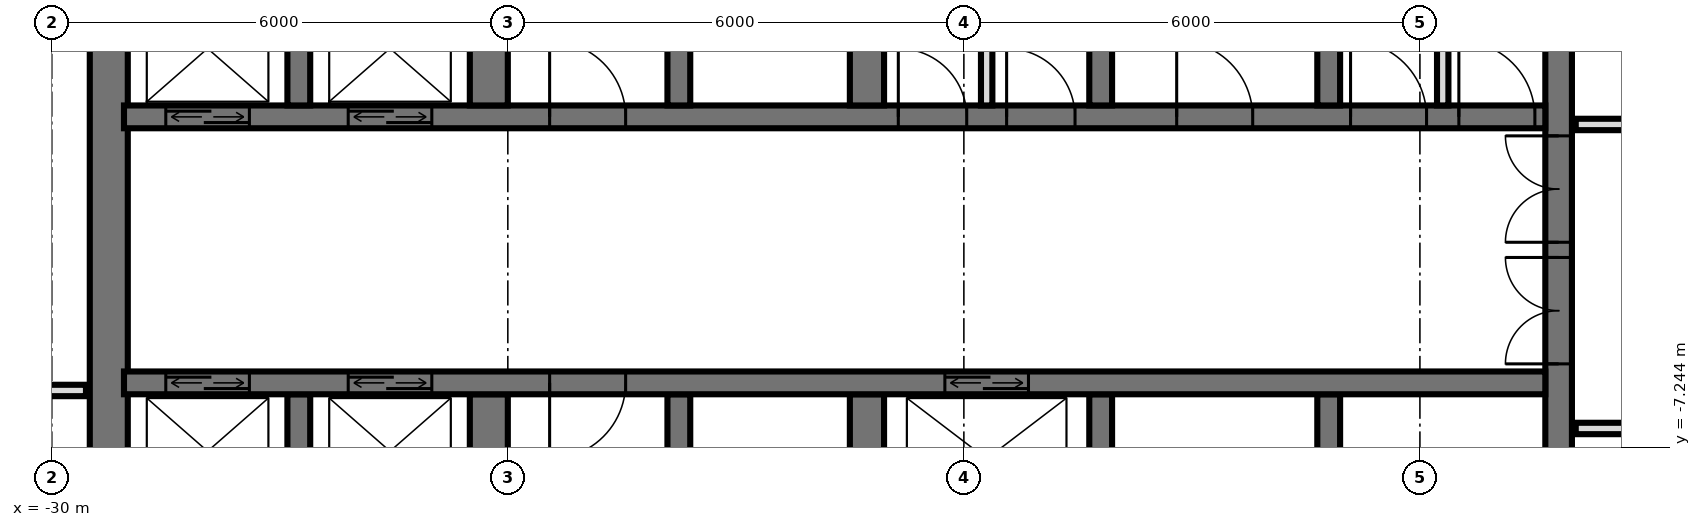
"""IFC4 building model, lengths in metres.
Left out: names, types, materials, properties, quantities, classifications, styles, units other than length and angle.
Written with IfcOpenShell. Run it as: python <this file> out.ifc"""

import sys

from ifc_helpers import new_model, si_unit, direction, frame, frame_2d, origin, place, context, subcontext, project, spatial, rectangle, extrude, element, fill, save


model = new_model("IFC4")
c1 = context("Model", 3, precision=1e-05, world=origin(), true_north=direction((0.0, 1.0)))
c2 = subcontext(c1, "Body", "Model", "MODEL_VIEW")
j1 = project(units=[si_unit("LENGTHUNIT", "METRE"), si_unit("PLANEANGLEUNIT", "RADIAN")], contexts=[c1])
p1 = place(None, origin())
s1 = spatial("IfcSite", under=j1, at=p1, CompositionType="ELEMENT")
p2 = place(p1, origin())
s2 = spatial("IfcBuilding", under=s1, at=p2, CompositionType="ELEMENT")
p3 = place(p2, frame((0.0, 0.0, 67.2)))
s3 = spatial("IfcBuildingStorey", under=s2, at=p3, CompositionType="ELEMENT", Elevation=67.2)
p4 = place(p3, frame((-10.175, -14.55, 0.0), z_axis=(0.0, 0.0, 1.0), x_axis=(0.0, 1.0, 0.0)))
e1 = element("IfcWall", 1, at=p4, inside=s3, PredefinedType="SHEAR", context=c2, shape_type="SweptSolid", body=[
    extrude(rectangle(XDim=14.1, YDim=0.35, at=frame_2d((7.05, 0.0))), origin(), (0.0, 0.0, 1.0), 3.6),
])
p5 = place(p4, frame((8.4, 0.0, 0.0)))
e2 = element("IfcOpeningElement", 2, at=p5, cuts=e1, PredefinedType="OPENING", context=c2, shape_type="SweptSolid", body=[
    extrude(rectangle(XDim=1.4, YDim=2.4, at=frame_2d((0.7, 1.2))), frame((0.0, 0.185, 0.0), z_axis=(0.0, -1.0, 0.0), x_axis=(1.0, 0.0, 0.0)), (0.0, 0.0, 1.0), 0.37),
])
p6 = place(p4, frame((10.0, 0.0, 0.0)))
e3 = element("IfcOpeningElement", 3, at=p6, cuts=e1, PredefinedType="OPENING", context=c2, shape_type="SweptSolid", body=[
    extrude(rectangle(XDim=1.4, YDim=2.4, at=frame_2d((0.7, 1.2))), frame((0.0, 0.185, 0.0), z_axis=(0.0, -1.0, 0.0), x_axis=(1.0, 0.0, 0.0)), (0.0, 0.0, 1.0), 0.37),
])
p7 = place(p4, frame((4.0, 0.0, 0.0)))
e4 = element("IfcOpeningElement", 4, at=p7, cuts=e1, PredefinedType="OPENING", context=c2, shape_type="SweptSolid", body=[
    extrude(rectangle(XDim=1.2, YDim=2.1, at=frame_2d((0.6, 1.05))), frame((0.0, 0.185, 0.0), z_axis=(0.0, -1.0, 0.0), x_axis=(1.0, 0.0, 0.0)), (0.0, 0.0, 1.0), 0.37),
])
p8 = place(p3, frame((-29.25, -14.55, 0.0), z_axis=(0.0, 0.0, 1.0), x_axis=(0.0, 1.0, 0.0)))
e5 = element("IfcWall", 5, at=p8, inside=s3, PredefinedType="SHEAR", context=c2, shape_type="SweptSolid", body=[
    extrude(rectangle(XDim=14.1, YDim=0.5, at=frame_2d((7.05, 0.0))), origin(), (0.0, 0.0, 1.0), 3.6),
])
p9 = place(p3, frame((-29.05, -2.9, 0.0), z_axis=(0.0, 0.0, 1.0), x_axis=(1.0, 0.0, 0.0)))
e6 = element("IfcWall", 6, at=p9, inside=s3, PredefinedType="SHEAR", context=c2, shape_type="SweptSolid", body=[
    extrude(rectangle(XDim=18.7, YDim=0.3, at=frame_2d((9.35, 0.0))), origin(), (0.0, 0.0, 1.0), 3.6),
])
p10 = place(p9, frame((2.95, 0.0, 0.0)))
e7 = element("IfcOpeningElement", 7, at=p10, cuts=e6, PredefinedType="OPENING", context=c2, shape_type="SweptSolid", body=[
    extrude(rectangle(XDim=1.1, YDim=2.1, at=frame_2d((0.55, 1.05))), frame((0.0, 0.16, 0.0), z_axis=(0.0, -1.0, 0.0), x_axis=(1.0, 0.0, 0.0)), (0.0, 0.0, 1.0), 0.32),
])
p11 = place(p9, frame((0.55, 0.0, 0.0)))
e8 = element("IfcOpeningElement", 8, at=p11, cuts=e6, PredefinedType="OPENING", context=c2, shape_type="SweptSolid", body=[
    extrude(rectangle(XDim=1.1, YDim=2.1, at=frame_2d((0.55, 1.05))), frame((0.0, 0.16, 0.0), z_axis=(0.0, -1.0, 0.0), x_axis=(1.0, 0.0, 0.0)), (0.0, 0.0, 1.0), 0.32),
])
p12 = place(p9, frame((11.613, 0.0, 0.0)))
e9 = element("IfcOpeningElement", 9, at=p12, cuts=e6, PredefinedType="OPENING", context=c2, shape_type="SweptSolid", body=[
    extrude(rectangle(XDim=0.9, YDim=2.1, at=frame_2d((0.45, 1.05))), frame((0.0, 0.16, 0.0), z_axis=(0.0, -1.0, 0.0), x_axis=(1.0, 0.0, 0.0)), (0.0, 0.0, 1.0), 0.32),
])
p13 = place(p9, frame((10.188, 0.0, 0.0)))
e10 = element("IfcOpeningElement", 10, at=p13, cuts=e6, PredefinedType="OPENING", context=c2, shape_type="SweptSolid", body=[
    extrude(rectangle(XDim=0.9, YDim=2.1, at=frame_2d((0.45, 1.05))), frame((0.0, 0.16, 0.0), z_axis=(0.0, -1.0, 0.0), x_axis=(1.0, 0.0, 0.0)), (0.0, 0.0, 1.0), 0.32),
])
p14 = place(p9, frame((17.562, 0.0, 0.0)))
e11 = element("IfcOpeningElement", 11, at=p14, cuts=e6, PredefinedType="OPENING", context=c2, shape_type="SweptSolid", body=[
    extrude(rectangle(XDim=1.0, YDim=2.1, at=frame_2d((0.5, 1.05))), frame((0.0, 0.16, 0.0), z_axis=(0.0, -1.0, 0.0), x_axis=(1.0, 0.0, 0.0)), (0.0, 0.0, 1.0), 0.32),
])
p15 = place(p9, frame((16.137, 0.0, 0.0)))
e12 = element("IfcOpeningElement", 12, at=p15, cuts=e6, PredefinedType="OPENING", context=c2, shape_type="SweptSolid", body=[
    extrude(rectangle(XDim=1.0, YDim=2.1, at=frame_2d((0.5, 1.05))), frame((0.0, 0.16, 0.0), z_axis=(0.0, -1.0, 0.0), x_axis=(1.0, 0.0, 0.0)), (0.0, 0.0, 1.0), 0.32),
])
p16 = place(p9, frame((13.85, 0.0, 0.0)))
e13 = element("IfcOpeningElement", 13, at=p16, cuts=e6, PredefinedType="OPENING", context=c2, shape_type="SweptSolid", body=[
    extrude(rectangle(XDim=1.0, YDim=2.1, at=frame_2d((0.5, 1.05))), frame((0.0, 0.16, 0.0), z_axis=(0.0, -1.0, 0.0), x_axis=(1.0, 0.0, 0.0)), (0.0, 0.0, 1.0), 0.32),
])
p17 = place(p9, frame((5.6, 0.0, 0.0)))
e14 = element("IfcOpeningElement", 14, at=p17, cuts=e6, PredefinedType="OPENING", context=c2, shape_type="SweptSolid", body=[
    extrude(rectangle(XDim=1.0, YDim=2.1, at=frame_2d((0.5, 1.05))), frame((0.0, 0.16, 0.0), z_axis=(0.0, -1.0, 0.0), x_axis=(1.0, 0.0, 0.0)), (0.0, 0.0, 1.0), 0.32),
])
p18 = place(p3, frame((-29.05, -6.4, 0.0), z_axis=(0.0, 0.0, 1.0), x_axis=(1.0, 0.0, 0.0)))
e15 = element("IfcWall", 15, at=p18, inside=s3, PredefinedType="SHEAR", context=c2, shape_type="SweptSolid", body=[
    extrude(rectangle(XDim=18.7, YDim=0.3, at=frame_2d((9.35, 0.0))), origin(), (0.0, 0.0, 1.0), 3.6),
])
p19 = place(p18, frame((2.95, 0.0, 0.0)))
e16 = element("IfcOpeningElement", 16, at=p19, cuts=e15, PredefinedType="OPENING", context=c2, shape_type="SweptSolid", body=[
    extrude(rectangle(XDim=1.1, YDim=2.1, at=frame_2d((0.55, 1.05))), frame((0.0, 0.16, 0.0), z_axis=(0.0, -1.0, 0.0), x_axis=(1.0, 0.0, 0.0)), (0.0, 0.0, 1.0), 0.32),
])
p20 = place(p18, frame((0.55, 0.0, 0.0)))
e17 = element("IfcOpeningElement", 17, at=p20, cuts=e15, PredefinedType="OPENING", context=c2, shape_type="SweptSolid", body=[
    extrude(rectangle(XDim=1.1, YDim=2.1, at=frame_2d((0.55, 1.05))), frame((0.0, 0.16, 0.0), z_axis=(0.0, -1.0, 0.0), x_axis=(1.0, 0.0, 0.0)), (0.0, 0.0, 1.0), 0.32),
])
p21 = place(p18, frame((10.8, 0.0, 0.0)))
e18 = element("IfcOpeningElement", 18, at=p21, cuts=e15, PredefinedType="OPENING", context=c2, shape_type="SweptSolid", body=[
    extrude(rectangle(XDim=1.1, YDim=2.1, at=frame_2d((0.55, 1.05))), frame((0.0, 0.16, 0.0), z_axis=(0.0, -1.0, 0.0), x_axis=(1.0, 0.0, 0.0)), (0.0, 0.0, 1.0), 0.32),
])
p22 = place(p18, frame((5.6, 0.0, 0.0)))
e19 = element("IfcOpeningElement", 19, at=p22, cuts=e15, PredefinedType="OPENING", context=c2, shape_type="SweptSolid", body=[
    extrude(rectangle(XDim=1.0, YDim=2.1, at=frame_2d((0.5, 1.05))), frame((0.0, 0.16, 0.0), z_axis=(0.0, -1.0, 0.0), x_axis=(1.0, 0.0, 0.0)), (0.0, 0.0, 1.0), 0.32),
])
for number, where, z_axis, x_axis in (
    (20, (-13.2, -2.75, 0.0), (0.0, 0.0, 1.0), (0.0, 1.0, 0.0)),
    (21, (-13.2, -8.85, 0.0), (0.0, 0.0, 1.0), (0.0, 1.0, 0.0)),
    (22, (-16.2, -2.75, 0.0), (0.0, 0.0, 1.0), (0.0, 1.0, 0.0)),
    (23, (-16.2, -8.85, 0.0), (0.0, 0.0, 1.0), (0.0, 1.0, 0.0)),
):
    element("IfcWall", number, at=place(p3, frame(where, z_axis=z_axis, x_axis=x_axis)), inside=s3, PredefinedType="SHEAR", context=c2, shape_type="SweptSolid", body=[
        extrude(rectangle(XDim=2.3, YDim=0.3, at=frame_2d((1.15, 0.0))), origin(), (0.0, 0.0, 1.0), 3.6),
    ])
for number, where, z_axis, x_axis in (
    (24, (-19.275, -2.75, 0.0), (0.0, 0.0, 1.0), (0.0, 1.0, 0.0)),
    (25, (-19.275, -8.85, 0.0), (0.0, 0.0, 1.0), (0.0, 1.0, 0.0)),
):
    element("IfcWall", number, at=place(p3, frame(where, z_axis=z_axis, x_axis=x_axis)), inside=s3, PredefinedType="SHEAR", context=c2, shape_type="SweptSolid", body=[
        extrude(rectangle(XDim=2.3, YDim=0.45, at=frame_2d((1.15, 0.0))), origin(), (0.0, 0.0, 1.0), 3.6),
    ])
for number, where, z_axis, x_axis in (
    (26, (-21.75, -2.75, 0.0), (0.0, 0.0, 1.0), (0.0, 1.0, 0.0)),
    (27, (-21.75, -8.85, 0.0), (0.0, 0.0, 1.0), (0.0, 1.0, 0.0)),
):
    element("IfcWall", number, at=place(p3, frame(where, z_axis=z_axis, x_axis=x_axis)), inside=s3, PredefinedType="SHEAR", context=c2, shape_type="SweptSolid", body=[
        extrude(rectangle(XDim=2.3, YDim=0.3, at=frame_2d((1.15, 0.0))), origin(), (0.0, 0.0, 1.0), 3.6),
    ])
for number, where, z_axis, x_axis in (
    (28, (-24.25, -2.75, 0.0), (0.0, 0.0, 1.0), (0.0, 1.0, 0.0)),
    (29, (-24.25, -8.85, 0.0), (0.0, 0.0, 1.0), (0.0, 1.0, 0.0)),
):
    element("IfcWall", number, at=place(p3, frame(where, z_axis=z_axis, x_axis=x_axis)), inside=s3, PredefinedType="SHEAR", context=c2, shape_type="SweptSolid", body=[
        extrude(rectangle(XDim=2.3, YDim=0.5, at=frame_2d((1.15, 0.0))), origin(), (0.0, 0.0, 1.0), 3.6),
    ])
for number, where, z_axis, x_axis in (
    (30, (-26.75, -2.75, 0.0), (0.0, 0.0, 1.0), (0.0, 1.0, 0.0)),
    (31, (-26.75, -8.85, 0.0), (0.0, 0.0, 1.0), (0.0, 1.0, 0.0)),
):
    element("IfcWall", number, at=place(p3, frame(where, z_axis=z_axis, x_axis=x_axis)), inside=s3, PredefinedType="SHEAR", context=c2, shape_type="SweptSolid", body=[
        extrude(rectangle(XDim=2.3, YDim=0.3, at=frame_2d((1.15, 0.0))), origin(), (0.0, 0.0, 1.0), 3.6),
    ])
for number, where, z_axis, x_axis in (
    (32, (-17.7, -2.75, 0.0), (0.0, 0.0, 1.0), (0.0, 1.0, 0.0)),
    (33, (-11.7, -2.75, 0.0), (0.0, 0.0, 1.0), (0.0, 1.0, 0.0)),
):
    element("IfcWall", number, at=place(p3, frame(where, z_axis=z_axis, x_axis=x_axis)), inside=s3, PredefinedType="PARTITIONING", context=c2, shape_type="SweptSolid", body=[
        extrude(rectangle(XDim=2.3, YDim=0.15, at=frame_2d((1.15, 0.0))), origin(), (0.0, 0.0, 1.0), 3.3),
    ])
p23 = place(p3, frame((-9.95, -7.0, 0.0), z_axis=(0.0, 0.0, 1.0), x_axis=(1.0, 0.0, 0.0)))
e34 = element("IfcWall", 34, at=p23, inside=s3, PredefinedType="PARTITIONING", context=c2, shape_type="SweptSolid", body=[
    extrude(rectangle(XDim=19.9, YDim=0.15, at=frame_2d((9.95, 0.0))), origin(), (0.0, 0.0, 1.0), 3.32),
])
p24 = place(p23, frame((9.45, 0.0, 0.0)))
e35 = element("IfcOpeningElement", 35, at=p24, cuts=e34, PredefinedType="OPENING", context=c2, shape_type="SweptSolid", body=[
    extrude(rectangle(XDim=1.0, YDim=2.1, at=frame_2d((0.5, 1.05))), frame((0.0, 0.085, 0.0), z_axis=(0.0, -1.0, 0.0), x_axis=(1.0, 0.0, 0.0)), (0.0, 0.0, 1.0), 0.17),
])
p25 = place(p23, frame((3.45, 0.0, 0.0)))
e36 = element("IfcOpeningElement", 36, at=p25, cuts=e34, PredefinedType="OPENING", context=c2, shape_type="SweptSolid", body=[
    extrude(rectangle(XDim=1.0, YDim=2.1, at=frame_2d((0.5, 1.05))), frame((0.0, 0.085, 0.0), z_axis=(0.0, -1.0, 0.0), x_axis=(1.0, 0.0, 0.0)), (0.0, 0.0, 1.0), 0.17),
])
p26 = place(p3, frame((-33.12, -6.5, 0.0), z_axis=(0.0, 0.0, 1.0), x_axis=(1.0, 0.0, 0.0)))
e37 = element("IfcWall", 37, at=p26, inside=s3, PredefinedType="PARTITIONING", context=c2, shape_type="SweptSolid", body=[
    extrude(rectangle(XDim=3.57, YDim=0.15, at=frame_2d((1.785, 0.0))), origin(), (0.0, 0.0, 1.0), 3.32),
])
p27 = place(p26, frame((1.27, 0.0, 0.0)))
e38 = element("IfcOpeningElement", 38, at=p27, cuts=e37, PredefinedType="OPENING", context=c2, shape_type="SweptSolid", body=[
    extrude(rectangle(XDim=0.9, YDim=2.1, at=frame_2d((0.45, 1.05))), frame((0.0, 0.085, 0.0), z_axis=(0.0, -1.0, 0.0), x_axis=(1.0, 0.0, 0.0)), (0.0, 0.0, 1.0), 0.17),
])
p28 = place(p3, frame((-9.95, -3.0, 0.0), z_axis=(0.0, 0.0, 1.0), x_axis=(1.0, 0.0, 0.0)))
e39 = element("IfcWall", 39, at=p28, inside=s3, PredefinedType="PARTITIONING", context=c2, shape_type="SweptSolid", body=[
    extrude(rectangle(XDim=19.9, YDim=0.15, at=frame_2d((9.95, 0.0))), origin(), (0.0, 0.0, 1.0), 3.32),
])
p29 = place(p28, frame((1.45, 0.0, 0.0)))
e40 = element("IfcOpeningElement", 40, at=p29, cuts=e39, PredefinedType="OPENING", context=c2, shape_type="SweptSolid", body=[
    extrude(rectangle(XDim=1.0, YDim=2.1, at=frame_2d((0.5, 1.05))), frame((0.0, 0.085, 0.0), z_axis=(0.0, -1.0, 0.0), x_axis=(1.0, 0.0, 0.0)), (0.0, 0.0, 1.0), 0.17),
])
p30 = place(p28, frame((4.95, 0.0, 0.0)))
e41 = element("IfcOpeningElement", 41, at=p30, cuts=e39, PredefinedType="OPENING", context=c2, shape_type="SweptSolid", body=[
    extrude(rectangle(XDim=1.0, YDim=2.1, at=frame_2d((0.5, 1.05))), frame((0.0, 0.085, 0.0), z_axis=(0.0, -1.0, 0.0), x_axis=(1.0, 0.0, 0.0)), (0.0, 0.0, 1.0), 0.17),
])
p31 = place(p28, frame((7.7, 0.0, 0.0)))
e42 = element("IfcOpeningElement", 42, at=p31, cuts=e39, PredefinedType="OPENING", context=c2, shape_type="SweptSolid", body=[
    extrude(rectangle(XDim=1.0, YDim=2.1, at=frame_2d((0.5, 1.05))), frame((0.0, 0.085, 0.0), z_axis=(0.0, -1.0, 0.0), x_axis=(1.0, 0.0, 0.0)), (0.0, 0.0, 1.0), 0.17),
])
p32 = place(p28, frame((14.2, 0.0, 0.0)))
e43 = element("IfcOpeningElement", 43, at=p32, cuts=e39, PredefinedType="OPENING", context=c2, shape_type="SweptSolid", body=[
    extrude(rectangle(XDim=1.0, YDim=2.1, at=frame_2d((0.5, 1.05))), frame((0.0, 0.085, 0.0), z_axis=(0.0, -1.0, 0.0), x_axis=(1.0, 0.0, 0.0)), (0.0, 0.0, 1.0), 0.17),
])
p33 = place(p10, origin())
e44 = element("IfcDoor", 44, at=p33, inside=s3, OperationType="DOUBLE_DOOR_SLIDING", PredefinedType="USERDEFINED", context=c2, shape_type="SweptSolid", body=[
    extrude(rectangle(XDim=1.1, YDim=2.1, at=frame_2d((0.55, 1.05))), frame((0.0, 0.025, 0.0), z_axis=(0.0, -1.0, 0.0), x_axis=(1.0, 0.0, 0.0)), (0.0, 0.0, 1.0), 0.05),
])
fill(e7, e44)
p34 = place(p11, origin())
e45 = element("IfcDoor", 45, at=p34, inside=s3, OperationType="DOUBLE_DOOR_SLIDING", PredefinedType="USERDEFINED", context=c2, shape_type="SweptSolid", body=[
    extrude(rectangle(XDim=1.1, YDim=2.1, at=frame_2d((0.55, 1.05))), frame((0.0, 0.025, 0.0), z_axis=(0.0, -1.0, 0.0), x_axis=(1.0, 0.0, 0.0)), (0.0, 0.0, 1.0), 0.05),
])
fill(e8, e45)
p35 = place(p19, origin())
e46 = element("IfcDoor", 46, at=p35, inside=s3, OperationType="DOUBLE_DOOR_SLIDING", PredefinedType="USERDEFINED", context=c2, shape_type="SweptSolid", body=[
    extrude(rectangle(XDim=1.1, YDim=2.1, at=frame_2d((0.55, 1.05))), frame((0.0, 0.025, 0.0), z_axis=(0.0, -1.0, 0.0), x_axis=(1.0, 0.0, 0.0)), (0.0, 0.0, 1.0), 0.05),
])
fill(e16, e46)
p36 = place(p20, origin())
e47 = element("IfcDoor", 47, at=p36, inside=s3, OperationType="DOUBLE_DOOR_SLIDING", PredefinedType="USERDEFINED", context=c2, shape_type="SweptSolid", body=[
    extrude(rectangle(XDim=1.1, YDim=2.1, at=frame_2d((0.55, 1.05))), frame((0.0, 0.025, 0.0), z_axis=(0.0, -1.0, 0.0), x_axis=(1.0, 0.0, 0.0)), (0.0, 0.0, 1.0), 0.05),
])
fill(e17, e47)
p37 = place(p21, origin())
e48 = element("IfcDoor", 48, at=p37, inside=s3, OperationType="DOUBLE_DOOR_SLIDING", PredefinedType="USERDEFINED", context=c2, shape_type="SweptSolid", body=[
    extrude(rectangle(XDim=1.1, YDim=2.1, at=frame_2d((0.55, 1.05))), frame((0.0, 0.025, 0.0), z_axis=(0.0, -1.0, 0.0), x_axis=(1.0, 0.0, 0.0)), (0.0, 0.0, 1.0), 0.05),
])
fill(e18, e48)
p38 = place(p5, origin())
e49 = element("IfcDoor", 49, at=p38, inside=s3, OperationType="DOUBLE_DOOR_SINGLE_SWING", PredefinedType="DOOR", context=c2, shape_type="SweptSolid", body=[
    extrude(rectangle(XDim=1.4, YDim=2.4, at=frame_2d((0.7, 1.2))), frame((0.0, 0.025, 0.0), z_axis=(0.0, -1.0, 0.0), x_axis=(1.0, 0.0, 0.0)), (0.0, 0.0, 1.0), 0.05),
])
fill(e2, e49)
p39 = place(p6, origin())
e50 = element("IfcDoor", 50, at=p39, inside=s3, OperationType="DOUBLE_DOOR_SINGLE_SWING", PredefinedType="DOOR", context=c2, shape_type="SweptSolid", body=[
    extrude(rectangle(XDim=1.4, YDim=2.4, at=frame_2d((0.7, 1.2))), frame((0.0, 0.025, 0.0), z_axis=(0.0, -1.0, 0.0), x_axis=(1.0, 0.0, 0.0)), (0.0, 0.0, 1.0), 0.05),
])
fill(e3, e50)
p40 = place(p12, origin())
e51 = element("IfcDoor", 51, at=p40, inside=s3, OperationType="SINGLE_SWING_RIGHT", PredefinedType="DOOR", context=c2, shape_type="SweptSolid", body=[
    extrude(rectangle(XDim=0.9, YDim=2.1, at=frame_2d((0.45, 1.05))), frame((0.0, 0.025, 0.0), z_axis=(0.0, -1.0, 0.0), x_axis=(1.0, 0.0, 0.0)), (0.0, 0.0, 1.0), 0.05),
])
fill(e9, e51)
p41 = place(p13, origin())
e52 = element("IfcDoor", 52, at=p41, inside=s3, OperationType="SINGLE_SWING_RIGHT", PredefinedType="DOOR", context=c2, shape_type="SweptSolid", body=[
    extrude(rectangle(XDim=0.9, YDim=2.1, at=frame_2d((0.45, 1.05))), frame((0.0, 0.025, 0.0), z_axis=(0.0, -1.0, 0.0), x_axis=(1.0, 0.0, 0.0)), (0.0, 0.0, 1.0), 0.05),
])
fill(e10, e52)
p42 = place(p14, origin())
e53 = element("IfcDoor", 53, at=p42, inside=s3, OperationType="SINGLE_SWING_RIGHT", PredefinedType="DOOR", context=c2, shape_type="SweptSolid", body=[
    extrude(rectangle(XDim=1.0, YDim=2.1, at=frame_2d((0.5, 1.05))), frame((0.0, 0.025, 0.0), z_axis=(0.0, -1.0, 0.0), x_axis=(1.0, 0.0, 0.0)), (0.0, 0.0, 1.0), 0.05),
])
fill(e11, e53)
p43 = place(p15, origin())
e54 = element("IfcDoor", 54, at=p43, inside=s3, OperationType="SINGLE_SWING_RIGHT", PredefinedType="DOOR", context=c2, shape_type="SweptSolid", body=[
    extrude(rectangle(XDim=1.0, YDim=2.1, at=frame_2d((0.5, 1.05))), frame((0.0, 0.025, 0.0), z_axis=(0.0, -1.0, 0.0), x_axis=(1.0, 0.0, 0.0)), (0.0, 0.0, 1.0), 0.05),
])
fill(e12, e54)
p44 = place(p16, origin())
e55 = element("IfcDoor", 55, at=p44, inside=s3, OperationType="SINGLE_SWING_RIGHT", PredefinedType="DOOR", context=c2, shape_type="SweptSolid", body=[
    extrude(rectangle(XDim=1.0, YDim=2.1, at=frame_2d((0.5, 1.05))), frame((0.0, 0.025, 0.0), z_axis=(0.0, -1.0, 0.0), x_axis=(1.0, 0.0, 0.0)), (0.0, 0.0, 1.0), 0.05),
])
fill(e13, e55)
p45 = place(p17, origin())
e56 = element("IfcDoor", 56, at=p45, inside=s3, OperationType="SINGLE_SWING_RIGHT", PredefinedType="DOOR", context=c2, shape_type="SweptSolid", body=[
    extrude(rectangle(XDim=1.0, YDim=2.1, at=frame_2d((0.5, 1.05))), frame((0.0, 0.025, 0.0), z_axis=(0.0, -1.0, 0.0), x_axis=(1.0, 0.0, 0.0)), (0.0, 0.0, 1.0), 0.05),
])
fill(e14, e56)
p46 = place(p22, frame((0.5, 0.0, 0.0), z_axis=(0.0, 0.0, 1.0), x_axis=(-1.0, 0.0, 0.0)))
e57 = element("IfcDoor", 57, at=p46, inside=s3, OperationType="SINGLE_SWING_LEFT", PredefinedType="DOOR", context=c2, shape_type="SweptSolid", body=[
    extrude(rectangle(XDim=1.0, YDim=2.1, at=frame_2d((0.0, 1.05))), frame((0.0, -0.025, 0.0), z_axis=(0.0, 1.0, 0.0), x_axis=(-1.0, 0.0, 0.0)), (0.0, 0.0, 1.0), 0.05),
])
fill(e19, e57)
save(model, sys.argv[1])
